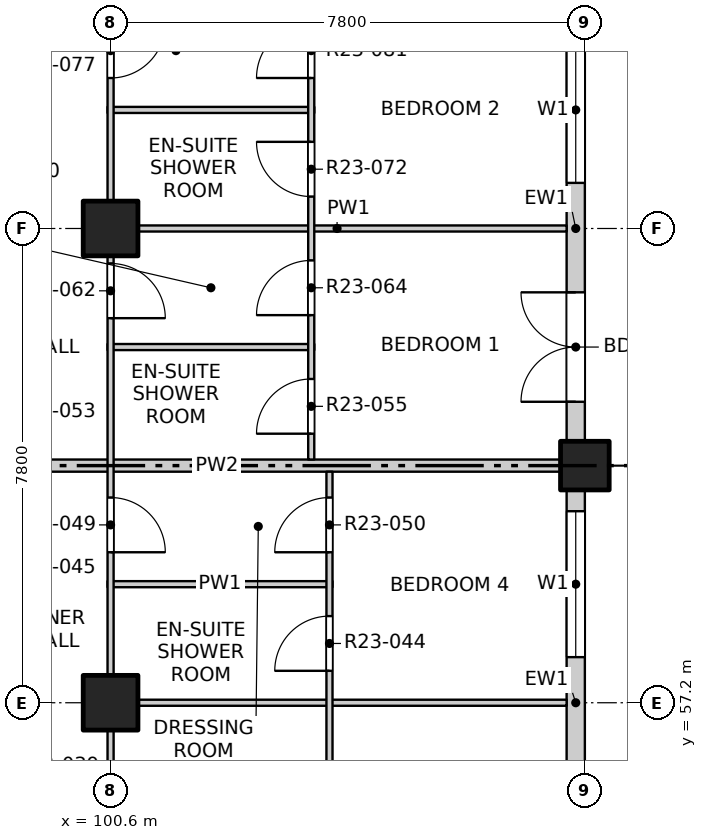
"""IFC4 building model, lengths in metres.
Left out: names, types, materials, properties, quantities, classifications, styles, units other than length and angle.
Written with IfcOpenShell. Run it as: python <this file> out.ifc"""

import sys

from ifc_helpers import new_model, si_unit, direction, frame, frame_2d, origin, origin_2d, place, context, subcontext, project, spatial, rectangle, extrude, element, fill, save


model = new_model("IFC4")
c1 = context("Model", 3, precision=1e-05, world=origin(), true_north=direction((0.0, 1.0)))
c2 = subcontext(c1, "Body", "Model", "MODEL_VIEW")
j1 = project(units=[si_unit("LENGTHUNIT", "METRE"), si_unit("PLANEANGLEUNIT", "RADIAN")], contexts=[c1])
p1 = place(None, origin())
s1 = spatial("IfcSite", under=j1, at=p1, CompositionType="ELEMENT")
p2 = place(p1, origin())
s2 = spatial("IfcBuilding", under=s1, at=p2, CompositionType="ELEMENT")
p3 = place(p2, frame((0.0, 0.0, 234.7)))
s3 = spatial("IfcBuildingStorey", under=s2, at=p3, CompositionType="ELEMENT", Elevation=234.7)
p4 = place(p3, frame((108.4, 61.1, -0.25), z_axis=(0.0, 0.0, 1.0), x_axis=(1.0, 0.0, 0.0)))
e1 = element("IfcColumn", 1, at=p4, inside=s3, PredefinedType="COLUMN", context=c2, shape_type="SweptSolid", body=[
    extrude(rectangle(XDim=0.8, YDim=0.8, at=origin_2d()), origin(), (0.0, 0.0, 1.0), 3.4),
])
for number, where, z_axis, x_axis in (
    (2, (100.6, 57.2, -0.25), (0.0, 0.0, 1.0), (1.0, 0.0, 0.0)),
    (3, (100.6, 65.0, -0.25), (0.0, 0.0, 1.0), (1.0, 0.0, 0.0)),
):
    element("IfcColumn", number, at=place(p3, frame(where, z_axis=z_axis, x_axis=x_axis)), inside=s3, PredefinedType="COLUMN", context=c2, shape_type="SweptSolid", body=[
        extrude(rectangle(XDim=0.9, YDim=0.9, at=origin_2d()), origin(), (0.0, 0.0, 1.0), 3.4),
    ])
p5 = place(p3, frame((108.25, 53.7, 0.0), z_axis=(0.0, 0.0, 1.0), x_axis=(0.0, 1.0, 0.0)))
e4 = element("IfcWall", 4, at=p5, inside=s3, PredefinedType="SOLIDWALL", context=c2, shape_type="SweptSolid", body=[
    extrude(rectangle(XDim=7.0, YDim=0.3, at=frame_2d((3.5, 0.0))), origin(), (0.0, 0.0, 1.0), 2.7),
])
p6 = place(p5, frame((0.65, 0.0, 0.0)))
e5 = element("IfcOpeningElement", 5, at=p6, cuts=e4, PredefinedType="OPENING", context=c2, shape_type="SweptSolid", body=[
    extrude(rectangle(XDim=1.8, YDim=2.4, at=frame_2d((0.9, 1.2))), frame((0.0, 0.16, 0.0), z_axis=(0.0, -1.0, 0.0), x_axis=(1.0, 0.0, 0.0)), (0.0, 0.0, 1.0), 0.32),
])
p7 = place(p5, frame((4.25, 0.0, 0.9)))
e6 = element("IfcOpeningElement", 6, at=p7, cuts=e4, PredefinedType="OPENING", context=c2, shape_type="SweptSolid", body=[
    extrude(rectangle(XDim=2.4, YDim=1.8, at=frame_2d((1.2, 0.9))), frame((0.0, 0.16, 0.0), z_axis=(0.0, -1.0, 0.0), x_axis=(1.0, 0.0, 0.0)), (0.0, 0.0, 1.0), 0.32),
])
p8 = place(p3, frame((108.25, 61.5, 0.0), z_axis=(0.0, 0.0, 1.0), x_axis=(0.0, 1.0, 0.0)))
e7 = element("IfcWall", 7, at=p8, inside=s3, PredefinedType="SOLIDWALL", context=c2, shape_type="SweptSolid", body=[
    extrude(rectangle(XDim=7.0, YDim=0.3, at=frame_2d((3.5, 0.0))), origin(), (0.0, 0.0, 1.0), 2.7),
])
p9 = place(p8, frame((0.65, 0.0, 0.0)))
e8 = element("IfcOpeningElement", 8, at=p9, cuts=e7, PredefinedType="OPENING", context=c2, shape_type="SweptSolid", body=[
    extrude(rectangle(XDim=1.8, YDim=2.4, at=frame_2d((0.9, 1.2))), frame((0.0, 0.16, 0.0), z_axis=(0.0, -1.0, 0.0), x_axis=(1.0, 0.0, 0.0)), (0.0, 0.0, 1.0), 0.32),
])
p10 = place(p8, frame((4.25, 0.0, 0.9)))
e9 = element("IfcOpeningElement", 9, at=p10, cuts=e7, PredefinedType="OPENING", context=c2, shape_type="SweptSolid", body=[
    extrude(rectangle(XDim=2.4, YDim=1.8, at=frame_2d((1.2, 0.9))), frame((0.0, 0.16, 0.0), z_axis=(0.0, -1.0, 0.0), x_axis=(1.0, 0.0, 0.0)), (0.0, 0.0, 1.0), 0.32),
])
p11 = place(p3, frame((100.55, 57.2, 0.0), z_axis=(0.0, 0.0, 1.0), x_axis=(1.0, 0.0, 0.0)))
e10 = element("IfcWall", 10, at=p11, inside=s3, PredefinedType="PARTITIONING", context=c2, shape_type="SweptSolid", body=[
    extrude(rectangle(XDim=7.55, YDim=0.1, at=frame_2d((3.775, 0.0))), origin(), (0.0, 0.0, 1.0), 3.15),
])
p12 = place(p3, frame((100.55, 59.15, 0.0), z_axis=(0.0, 0.0, 1.0), x_axis=(1.0, 0.0, 0.0)))
e11 = element("IfcWall", 11, at=p12, inside=s3, PredefinedType="PARTITIONING", context=c2, shape_type="SweptSolid", body=[
    extrude(rectangle(XDim=3.7, YDim=0.1, at=frame_2d((1.85, 0.0))), origin(), (0.0, 0.0, 1.0), 3.15),
])
p13 = place(p3, frame((96.6, 61.1, 0.0), z_axis=(0.0, 0.0, 1.0), x_axis=(1.0, 0.0, 0.0)))
e12 = element("IfcWall", 12, at=p13, inside=s3, PredefinedType="PARTITIONING", context=c2, shape_type="SweptSolid", body=[
    extrude(rectangle(XDim=11.5, YDim=0.2, at=frame_2d((5.75, 0.0))), origin(), (0.0, 0.0, 1.0), 2.55),
])
p14 = place(p3, frame((100.55, 63.05, 0.0), z_axis=(0.0, 0.0, 1.0), x_axis=(1.0, 0.0, 0.0)))
e13 = element("IfcWall", 13, at=p14, inside=s3, PredefinedType="PARTITIONING", context=c2, shape_type="SweptSolid", body=[
    extrude(rectangle(XDim=3.4, YDim=0.1, at=frame_2d((1.7, 0.0))), origin(), (0.0, 0.0, 1.0), 3.15),
])
p15 = place(p3, frame((100.55, 65.0, 0.0), z_axis=(0.0, 0.0, 1.0), x_axis=(1.0, 0.0, 0.0)))
e14 = element("IfcWall", 14, at=p15, inside=s3, PredefinedType="PARTITIONING", context=c2, shape_type="SweptSolid", body=[
    extrude(rectangle(XDim=7.55, YDim=0.1, at=frame_2d((3.775, 0.0))), origin(), (0.0, 0.0, 1.0), 3.15),
])
p16 = place(p3, frame((100.55, 66.95, 0.0), z_axis=(0.0, 0.0, 1.0), x_axis=(1.0, 0.0, 0.0)))
e15 = element("IfcWall", 15, at=p16, inside=s3, PredefinedType="PARTITIONING", context=c2, shape_type="SweptSolid", body=[
    extrude(rectangle(XDim=3.4, YDim=0.1, at=frame_2d((1.7, 0.0))), origin(), (0.0, 0.0, 1.0), 3.15),
])
p17 = place(p3, frame((100.6, 41.9, 0.0), z_axis=(0.0, 0.0, 1.0), x_axis=(0.0, 1.0, 0.0)))
e16 = element("IfcWall", 16, at=p17, inside=s3, PredefinedType="PARTITIONING", context=c2, shape_type="SweptSolid", body=[
    extrude(rectangle(XDim=46.2, YDim=0.1, at=frame_2d((23.1, 0.0))), origin(), (0.0, 0.0, 1.0), 3.15),
])
p18 = place(p17, frame((1.2, 0.0, 0.0)))
e17 = element("IfcOpeningElement", 17, at=p18, cuts=e16, PredefinedType="OPENING", context=c2, shape_type="SweptSolid", body=[
    extrude(rectangle(XDim=0.9, YDim=2.1, at=frame_2d((0.45, 1.05))), frame((0.0, 0.06, 0.0), z_axis=(0.0, -1.0, 0.0), x_axis=(1.0, 0.0, 0.0)), (0.0, 0.0, 1.0), 0.12),
])
p19 = place(p17, frame((6.025, 0.0, 0.0)))
e18 = element("IfcOpeningElement", 18, at=p19, cuts=e16, PredefinedType="OPENING", context=c2, shape_type="SweptSolid", body=[
    extrude(rectangle(XDim=0.9, YDim=2.1, at=frame_2d((0.45, 1.05))), frame((0.0, 0.06, 0.0), z_axis=(0.0, -1.0, 0.0), x_axis=(1.0, 0.0, 0.0)), (0.0, 0.0, 1.0), 0.12),
])
p20 = place(p17, frame((9.975, 0.0, 0.0)))
e19 = element("IfcOpeningElement", 19, at=p20, cuts=e16, PredefinedType="OPENING", context=c2, shape_type="SweptSolid", body=[
    extrude(rectangle(XDim=0.9, YDim=2.1, at=frame_2d((0.45, 1.05))), frame((0.0, 0.06, 0.0), z_axis=(0.0, -1.0, 0.0), x_axis=(1.0, 0.0, 0.0)), (0.0, 0.0, 1.0), 0.12),
])
p21 = place(p17, frame((12.9, 0.0, 0.0)))
e20 = element("IfcOpeningElement", 20, at=p21, cuts=e16, PredefinedType="OPENING", context=c2, shape_type="SweptSolid", body=[
    extrude(rectangle(XDim=0.9, YDim=2.1, at=frame_2d((0.45, 1.05))), frame((0.0, 0.06, 0.0), z_axis=(0.0, -1.0, 0.0), x_axis=(1.0, 0.0, 0.0)), (0.0, 0.0, 1.0), 0.12),
])
p22 = place(p17, frame((17.775, 0.0, 0.0)))
e21 = element("IfcOpeningElement", 21, at=p22, cuts=e16, PredefinedType="OPENING", context=c2, shape_type="SweptSolid", body=[
    extrude(rectangle(XDim=0.9, YDim=2.1, at=frame_2d((0.45, 1.05))), frame((0.0, 0.06, 0.0), z_axis=(0.0, -1.0, 0.0), x_axis=(1.0, 0.0, 0.0)), (0.0, 0.0, 1.0), 0.12),
])
p23 = place(p17, frame((21.625, 0.0, 0.0)))
e22 = element("IfcOpeningElement", 22, at=p23, cuts=e16, PredefinedType="OPENING", context=c2, shape_type="SweptSolid", body=[
    extrude(rectangle(XDim=0.9, YDim=2.1, at=frame_2d((0.45, 1.05))), frame((0.0, 0.06, 0.0), z_axis=(0.0, -1.0, 0.0), x_axis=(1.0, 0.0, 0.0)), (0.0, 0.0, 1.0), 0.12),
])
p24 = place(p17, frame((25.575, 0.0, 0.0)))
e23 = element("IfcOpeningElement", 23, at=p24, cuts=e16, PredefinedType="OPENING", context=c2, shape_type="SweptSolid", body=[
    extrude(rectangle(XDim=0.9, YDim=2.1, at=frame_2d((0.45, 1.05))), frame((0.0, 0.06, 0.0), z_axis=(0.0, -1.0, 0.0), x_axis=(1.0, 0.0, 0.0)), (0.0, 0.0, 1.0), 0.12),
])
p25 = place(p17, frame((28.5, 0.0, 0.0)))
e24 = element("IfcOpeningElement", 24, at=p25, cuts=e16, PredefinedType="OPENING", context=c2, shape_type="SweptSolid", body=[
    extrude(rectangle(XDim=0.9, YDim=2.1, at=frame_2d((0.45, 1.05))), frame((0.0, 0.06, 0.0), z_axis=(0.0, -1.0, 0.0), x_axis=(1.0, 0.0, 0.0)), (0.0, 0.0, 1.0), 0.12),
])
p26 = place(p17, frame((33.375, 0.0, 0.0)))
e25 = element("IfcOpeningElement", 25, at=p26, cuts=e16, PredefinedType="OPENING", context=c2, shape_type="SweptSolid", body=[
    extrude(rectangle(XDim=0.9, YDim=2.1, at=frame_2d((0.45, 1.05))), frame((0.0, 0.06, 0.0), z_axis=(0.0, -1.0, 0.0), x_axis=(1.0, 0.0, 0.0)), (0.0, 0.0, 1.0), 0.12),
])
p27 = place(p17, frame((36.3, 0.0, 0.0)))
e26 = element("IfcOpeningElement", 26, at=p27, cuts=e16, PredefinedType="OPENING", context=c2, shape_type="SweptSolid", body=[
    extrude(rectangle(XDim=0.9, YDim=2.1, at=frame_2d((0.45, 1.05))), frame((0.0, 0.06, 0.0), z_axis=(0.0, -1.0, 0.0), x_axis=(1.0, 0.0, 0.0)), (0.0, 0.0, 1.0), 0.12),
])
p28 = place(p17, frame((40.2, 0.0, 0.0)))
e27 = element("IfcOpeningElement", 27, at=p28, cuts=e16, PredefinedType="OPENING", context=c2, shape_type="SweptSolid", body=[
    extrude(rectangle(XDim=0.9, YDim=2.1, at=frame_2d((0.45, 1.05))), frame((0.0, 0.06, 0.0), z_axis=(0.0, -1.0, 0.0), x_axis=(1.0, 0.0, 0.0)), (0.0, 0.0, 1.0), 0.12),
])
p29 = place(p17, frame((44.1, 0.0, 0.0)))
e28 = element("IfcOpeningElement", 28, at=p29, cuts=e16, PredefinedType="OPENING", context=c2, shape_type="SweptSolid", body=[
    extrude(rectangle(XDim=0.9, YDim=2.1, at=frame_2d((0.45, 1.05))), frame((0.0, 0.06, 0.0), z_axis=(0.0, -1.0, 0.0), x_axis=(1.0, 0.0, 0.0)), (0.0, 0.0, 1.0), 0.12),
])
p30 = place(p3, frame((103.9, 61.2, 0.0), z_axis=(0.0, 0.0, 1.0), x_axis=(0.0, 1.0, 0.0)))
e29 = element("IfcWall", 29, at=p30, inside=s3, PredefinedType="PARTITIONING", context=c2, shape_type="SweptSolid", body=[
    extrude(rectangle(XDim=26.9, YDim=0.1, at=frame_2d((13.45, 0.0))), origin(), (0.0, 0.0, 1.0), 3.15),
])
p31 = place(p30, frame((0.425, 0.0, 0.0)))
e30 = element("IfcOpeningElement", 30, at=p31, cuts=e29, PredefinedType="OPENING", context=c2, shape_type="SweptSolid", body=[
    extrude(rectangle(XDim=0.9, YDim=2.1, at=frame_2d((0.45, 1.05))), frame((0.0, 0.06, 0.0), z_axis=(0.0, -1.0, 0.0), x_axis=(1.0, 0.0, 0.0)), (0.0, 0.0, 1.0), 0.12),
])
p32 = place(p30, frame((2.375, 0.0, 0.0)))
e31 = element("IfcOpeningElement", 31, at=p32, cuts=e29, PredefinedType="OPENING", context=c2, shape_type="SweptSolid", body=[
    extrude(rectangle(XDim=0.9, YDim=2.1, at=frame_2d((0.45, 1.05))), frame((0.0, 0.06, 0.0), z_axis=(0.0, -1.0, 0.0), x_axis=(1.0, 0.0, 0.0)), (0.0, 0.0, 1.0), 0.12),
])
p33 = place(p30, frame((4.325, 0.0, 0.0)))
e32 = element("IfcOpeningElement", 32, at=p33, cuts=e29, PredefinedType="OPENING", context=c2, shape_type="SweptSolid", body=[
    extrude(rectangle(XDim=0.9, YDim=2.1, at=frame_2d((0.45, 1.05))), frame((0.0, 0.06, 0.0), z_axis=(0.0, -1.0, 0.0), x_axis=(1.0, 0.0, 0.0)), (0.0, 0.0, 1.0), 0.12),
])
p34 = place(p30, frame((6.275, 0.0, 0.0)))
e33 = element("IfcOpeningElement", 33, at=p34, cuts=e29, PredefinedType="OPENING", context=c2, shape_type="SweptSolid", body=[
    extrude(rectangle(XDim=0.9, YDim=2.1, at=frame_2d((0.45, 1.05))), frame((0.0, 0.06, 0.0), z_axis=(0.0, -1.0, 0.0), x_axis=(1.0, 0.0, 0.0)), (0.0, 0.0, 1.0), 0.12),
])
p35 = place(p30, frame((9.05, 0.0, 0.0)))
e34 = element("IfcOpeningElement", 34, at=p35, cuts=e29, PredefinedType="OPENING", context=c2, shape_type="SweptSolid", body=[
    extrude(rectangle(XDim=1.2, YDim=2.1, at=frame_2d((0.6, 1.05))), frame((0.0, 0.06, 0.0), z_axis=(0.0, -1.0, 0.0), x_axis=(1.0, 0.0, 0.0)), (0.0, 0.0, 1.0), 0.12),
])
p36 = place(p30, frame((12.125, 0.0, 0.0)))
e35 = element("IfcOpeningElement", 35, at=p36, cuts=e29, PredefinedType="OPENING", context=c2, shape_type="SweptSolid", body=[
    extrude(rectangle(XDim=0.9, YDim=2.1, at=frame_2d((0.45, 1.05))), frame((0.0, 0.06, 0.0), z_axis=(0.0, -1.0, 0.0), x_axis=(1.0, 0.0, 0.0)), (0.0, 0.0, 1.0), 0.12),
])
p37 = place(p30, frame((14.075, 0.0, 0.0)))
e36 = element("IfcOpeningElement", 36, at=p37, cuts=e29, PredefinedType="OPENING", context=c2, shape_type="SweptSolid", body=[
    extrude(rectangle(XDim=0.9, YDim=2.1, at=frame_2d((0.45, 1.05))), frame((0.0, 0.06, 0.0), z_axis=(0.0, -1.0, 0.0), x_axis=(1.0, 0.0, 0.0)), (0.0, 0.0, 1.0), 0.12),
])
p38 = place(p30, frame((16.85, 0.0, 0.0)))
e37 = element("IfcOpeningElement", 37, at=p38, cuts=e29, PredefinedType="OPENING", context=c2, shape_type="SweptSolid", body=[
    extrude(rectangle(XDim=1.2, YDim=2.1, at=frame_2d((0.6, 1.05))), frame((0.0, 0.06, 0.0), z_axis=(0.0, -1.0, 0.0), x_axis=(1.0, 0.0, 0.0)), (0.0, 0.0, 1.0), 0.12),
])
p39 = place(p30, frame((20.75, 0.0, 0.0)))
e38 = element("IfcOpeningElement", 38, at=p39, cuts=e29, PredefinedType="OPENING", context=c2, shape_type="SweptSolid", body=[
    extrude(rectangle(XDim=1.2, YDim=2.1, at=frame_2d((0.6, 1.05))), frame((0.0, 0.06, 0.0), z_axis=(0.0, -1.0, 0.0), x_axis=(1.0, 0.0, 0.0)), (0.0, 0.0, 1.0), 0.12),
])
p40 = place(p30, frame((24.65, 0.0, 0.0)))
e39 = element("IfcOpeningElement", 39, at=p40, cuts=e29, PredefinedType="OPENING", context=c2, shape_type="SweptSolid", body=[
    extrude(rectangle(XDim=1.2, YDim=2.1, at=frame_2d((0.6, 1.05))), frame((0.0, 0.06, 0.0), z_axis=(0.0, -1.0, 0.0), x_axis=(1.0, 0.0, 0.0)), (0.0, 0.0, 1.0), 0.12),
])
p41 = place(p3, frame((104.2, 41.9, 0.0), z_axis=(0.0, 0.0, 1.0), x_axis=(0.0, 1.0, 0.0)))
e40 = element("IfcWall", 40, at=p41, inside=s3, PredefinedType="PARTITIONING", context=c2, shape_type="SweptSolid", body=[
    extrude(rectangle(XDim=19.1, YDim=0.1, at=frame_2d((9.55, 0.0))), origin(), (0.0, 0.0, 1.0), 3.15),
])
p42 = place(p41, frame((1.05, 0.0, 0.0)))
e41 = element("IfcOpeningElement", 41, at=p42, cuts=e40, PredefinedType="OPENING", context=c2, shape_type="SweptSolid", body=[
    extrude(rectangle(XDim=1.2, YDim=2.1, at=frame_2d((0.6, 1.05))), frame((0.0, 0.06, 0.0), z_axis=(0.0, -1.0, 0.0), x_axis=(1.0, 0.0, 0.0)), (0.0, 0.0, 1.0), 0.12),
])
p43 = place(p41, frame((4.125, 0.0, 0.0)))
e42 = element("IfcOpeningElement", 42, at=p43, cuts=e40, PredefinedType="OPENING", context=c2, shape_type="SweptSolid", body=[
    extrude(rectangle(XDim=0.9, YDim=2.1, at=frame_2d((0.45, 1.05))), frame((0.0, 0.06, 0.0), z_axis=(0.0, -1.0, 0.0), x_axis=(1.0, 0.0, 0.0)), (0.0, 0.0, 1.0), 0.12),
])
p44 = place(p41, frame((6.075, 0.0, 0.0)))
e43 = element("IfcOpeningElement", 43, at=p44, cuts=e40, PredefinedType="OPENING", context=c2, shape_type="SweptSolid", body=[
    extrude(rectangle(XDim=0.9, YDim=2.1, at=frame_2d((0.45, 1.05))), frame((0.0, 0.06, 0.0), z_axis=(0.0, -1.0, 0.0), x_axis=(1.0, 0.0, 0.0)), (0.0, 0.0, 1.0), 0.12),
])
p45 = place(p41, frame((8.025, 0.0, 0.0)))
e44 = element("IfcOpeningElement", 44, at=p45, cuts=e40, PredefinedType="OPENING", context=c2, shape_type="SweptSolid", body=[
    extrude(rectangle(XDim=0.9, YDim=2.1, at=frame_2d((0.45, 1.05))), frame((0.0, 0.06, 0.0), z_axis=(0.0, -1.0, 0.0), x_axis=(1.0, 0.0, 0.0)), (0.0, 0.0, 1.0), 0.12),
])
p46 = place(p41, frame((9.975, 0.0, 0.0)))
e45 = element("IfcOpeningElement", 45, at=p46, cuts=e40, PredefinedType="OPENING", context=c2, shape_type="SweptSolid", body=[
    extrude(rectangle(XDim=0.9, YDim=2.1, at=frame_2d((0.45, 1.05))), frame((0.0, 0.06, 0.0), z_axis=(0.0, -1.0, 0.0), x_axis=(1.0, 0.0, 0.0)), (0.0, 0.0, 1.0), 0.12),
])
p47 = place(p41, frame((12.75, 0.0, 0.0)))
e46 = element("IfcOpeningElement", 46, at=p47, cuts=e40, PredefinedType="OPENING", context=c2, shape_type="SweptSolid", body=[
    extrude(rectangle(XDim=1.2, YDim=2.1, at=frame_2d((0.6, 1.05))), frame((0.0, 0.06, 0.0), z_axis=(0.0, -1.0, 0.0), x_axis=(1.0, 0.0, 0.0)), (0.0, 0.0, 1.0), 0.12),
])
p48 = place(p41, frame((15.825, 0.0, 0.0)))
e47 = element("IfcOpeningElement", 47, at=p48, cuts=e40, PredefinedType="OPENING", context=c2, shape_type="SweptSolid", body=[
    extrude(rectangle(XDim=0.9, YDim=2.1, at=frame_2d((0.45, 1.05))), frame((0.0, 0.06, 0.0), z_axis=(0.0, -1.0, 0.0), x_axis=(1.0, 0.0, 0.0)), (0.0, 0.0, 1.0), 0.12),
])
p49 = place(p41, frame((17.775, 0.0, 0.0)))
e48 = element("IfcOpeningElement", 48, at=p49, cuts=e40, PredefinedType="OPENING", context=c2, shape_type="SweptSolid", body=[
    extrude(rectangle(XDim=0.9, YDim=2.1, at=frame_2d((0.45, 1.05))), frame((0.0, 0.06, 0.0), z_axis=(0.0, -1.0, 0.0), x_axis=(1.0, 0.0, 0.0)), (0.0, 0.0, 1.0), 0.12),
])
p50 = place(p7, origin())
e49 = element("IfcWindow", 49, at=p50, inside=s3, PartitioningType="DOUBLE_PANEL_VERTICAL", PredefinedType="WINDOW", context=c2, shape_type="SweptSolid", body=[
    extrude(rectangle(XDim=2.4, YDim=1.8, at=frame_2d((1.2, 0.9))), frame((0.0, 0.03, 0.0), z_axis=(0.0, -1.0, 0.0), x_axis=(1.0, 0.0, 0.0)), (0.0, 0.0, 1.0), 0.06),
])
fill(e6, e49)
p51 = place(p9, origin())
e50 = element("IfcDoor", 50, at=p51, inside=s3, OperationType="DOUBLE_DOOR_SINGLE_SWING", PredefinedType="DOOR", context=c2, shape_type="SweptSolid", body=[
    extrude(rectangle(XDim=1.8, YDim=2.4, at=frame_2d((0.9, 1.2))), frame((0.0, 0.025, 0.0), z_axis=(0.0, -1.0, 0.0), x_axis=(1.0, 0.0, 0.0)), (0.0, 0.0, 1.0), 0.05),
])
fill(e8, e50)
p52 = place(p10, origin())
e51 = element("IfcWindow", 51, at=p52, inside=s3, PartitioningType="DOUBLE_PANEL_VERTICAL", PredefinedType="WINDOW", context=c2, shape_type="SweptSolid", body=[
    extrude(rectangle(XDim=2.4, YDim=1.8, at=frame_2d((1.2, 0.9))), frame((0.0, 0.03, 0.0), z_axis=(0.0, -1.0, 0.0), x_axis=(1.0, 0.0, 0.0)), (0.0, 0.0, 1.0), 0.06),
])
fill(e9, e51)
p53 = place(p48, origin())
e52 = element("IfcDoor", 52, at=p53, inside=s3, OperationType="SINGLE_SWING_LEFT", PredefinedType="DOOR", context=c2, shape_type="SweptSolid", body=[
    extrude(rectangle(XDim=0.9, YDim=2.1, at=frame_2d((0.45, 1.05))), frame((0.0, 0.025, 0.0), z_axis=(0.0, -1.0, 0.0), x_axis=(1.0, 0.0, 0.0)), (0.0, 0.0, 1.0), 0.05),
])
fill(e47, e52)
p54 = place(p22, origin())
e53 = element("IfcDoor", 53, at=p54, inside=s3, OperationType="SINGLE_SWING_RIGHT", PredefinedType="DOOR", context=c2, shape_type="SweptSolid", body=[
    extrude(rectangle(XDim=0.9, YDim=2.1, at=frame_2d((0.45, 1.05))), frame((0.0, 0.025, 0.0), z_axis=(0.0, -1.0, 0.0), x_axis=(1.0, 0.0, 0.0)), (0.0, 0.0, 1.0), 0.05),
])
fill(e21, e53)
p55 = place(p49, origin())
e54 = element("IfcDoor", 54, at=p55, inside=s3, OperationType="SINGLE_SWING_LEFT", PredefinedType="DOOR", context=c2, shape_type="SweptSolid", body=[
    extrude(rectangle(XDim=0.9, YDim=2.1, at=frame_2d((0.45, 1.05))), frame((0.0, 0.025, 0.0), z_axis=(0.0, -1.0, 0.0), x_axis=(1.0, 0.0, 0.0)), (0.0, 0.0, 1.0), 0.05),
])
fill(e48, e54)
p56 = place(p31, origin())
e55 = element("IfcDoor", 55, at=p56, inside=s3, OperationType="SINGLE_SWING_LEFT", PredefinedType="DOOR", context=c2, shape_type="SweptSolid", body=[
    extrude(rectangle(XDim=0.9, YDim=2.1, at=frame_2d((0.45, 1.05))), frame((0.0, 0.025, 0.0), z_axis=(0.0, -1.0, 0.0), x_axis=(1.0, 0.0, 0.0)), (0.0, 0.0, 1.0), 0.05),
])
fill(e30, e55)
p57 = place(p23, origin())
e56 = element("IfcDoor", 56, at=p57, inside=s3, OperationType="SINGLE_SWING_RIGHT", PredefinedType="DOOR", context=c2, shape_type="SweptSolid", body=[
    extrude(rectangle(XDim=0.9, YDim=2.1, at=frame_2d((0.45, 1.05))), frame((0.0, 0.025, 0.0), z_axis=(0.0, -1.0, 0.0), x_axis=(1.0, 0.0, 0.0)), (0.0, 0.0, 1.0), 0.05),
])
fill(e22, e56)
p58 = place(p32, origin())
e57 = element("IfcDoor", 57, at=p58, inside=s3, OperationType="SINGLE_SWING_LEFT", PredefinedType="DOOR", context=c2, shape_type="SweptSolid", body=[
    extrude(rectangle(XDim=0.9, YDim=2.1, at=frame_2d((0.45, 1.05))), frame((0.0, 0.025, 0.0), z_axis=(0.0, -1.0, 0.0), x_axis=(1.0, 0.0, 0.0)), (0.0, 0.0, 1.0), 0.05),
])
fill(e31, e57)
p59 = place(p33, origin())
e58 = element("IfcDoor", 58, at=p59, inside=s3, OperationType="SINGLE_SWING_RIGHT", PredefinedType="DOOR", context=c2, shape_type="SweptSolid", body=[
    extrude(rectangle(XDim=0.9, YDim=2.1, at=frame_2d((0.45, 1.05))), frame((0.0, 0.025, 0.0), z_axis=(0.0, -1.0, 0.0), x_axis=(1.0, 0.0, 0.0)), (0.0, 0.0, 1.0), 0.05),
])
fill(e32, e58)
p60 = place(p24, origin())
e59 = element("IfcDoor", 59, at=p60, inside=s3, OperationType="SINGLE_SWING_LEFT", PredefinedType="DOOR", context=c2, shape_type="SweptSolid", body=[
    extrude(rectangle(XDim=0.9, YDim=2.1, at=frame_2d((0.45, 1.05))), frame((0.0, 0.025, 0.0), z_axis=(0.0, -1.0, 0.0), x_axis=(1.0, 0.0, 0.0)), (0.0, 0.0, 1.0), 0.05),
])
fill(e23, e59)
p61 = place(p34, origin())
e60 = element("IfcDoor", 60, at=p61, inside=s3, OperationType="SINGLE_SWING_LEFT", PredefinedType="DOOR", context=c2, shape_type="SweptSolid", body=[
    extrude(rectangle(XDim=0.9, YDim=2.1, at=frame_2d((0.45, 1.05))), frame((0.0, 0.025, 0.0), z_axis=(0.0, -1.0, 0.0), x_axis=(1.0, 0.0, 0.0)), (0.0, 0.0, 1.0), 0.05),
])
fill(e33, e60)
save(model, sys.argv[1])
